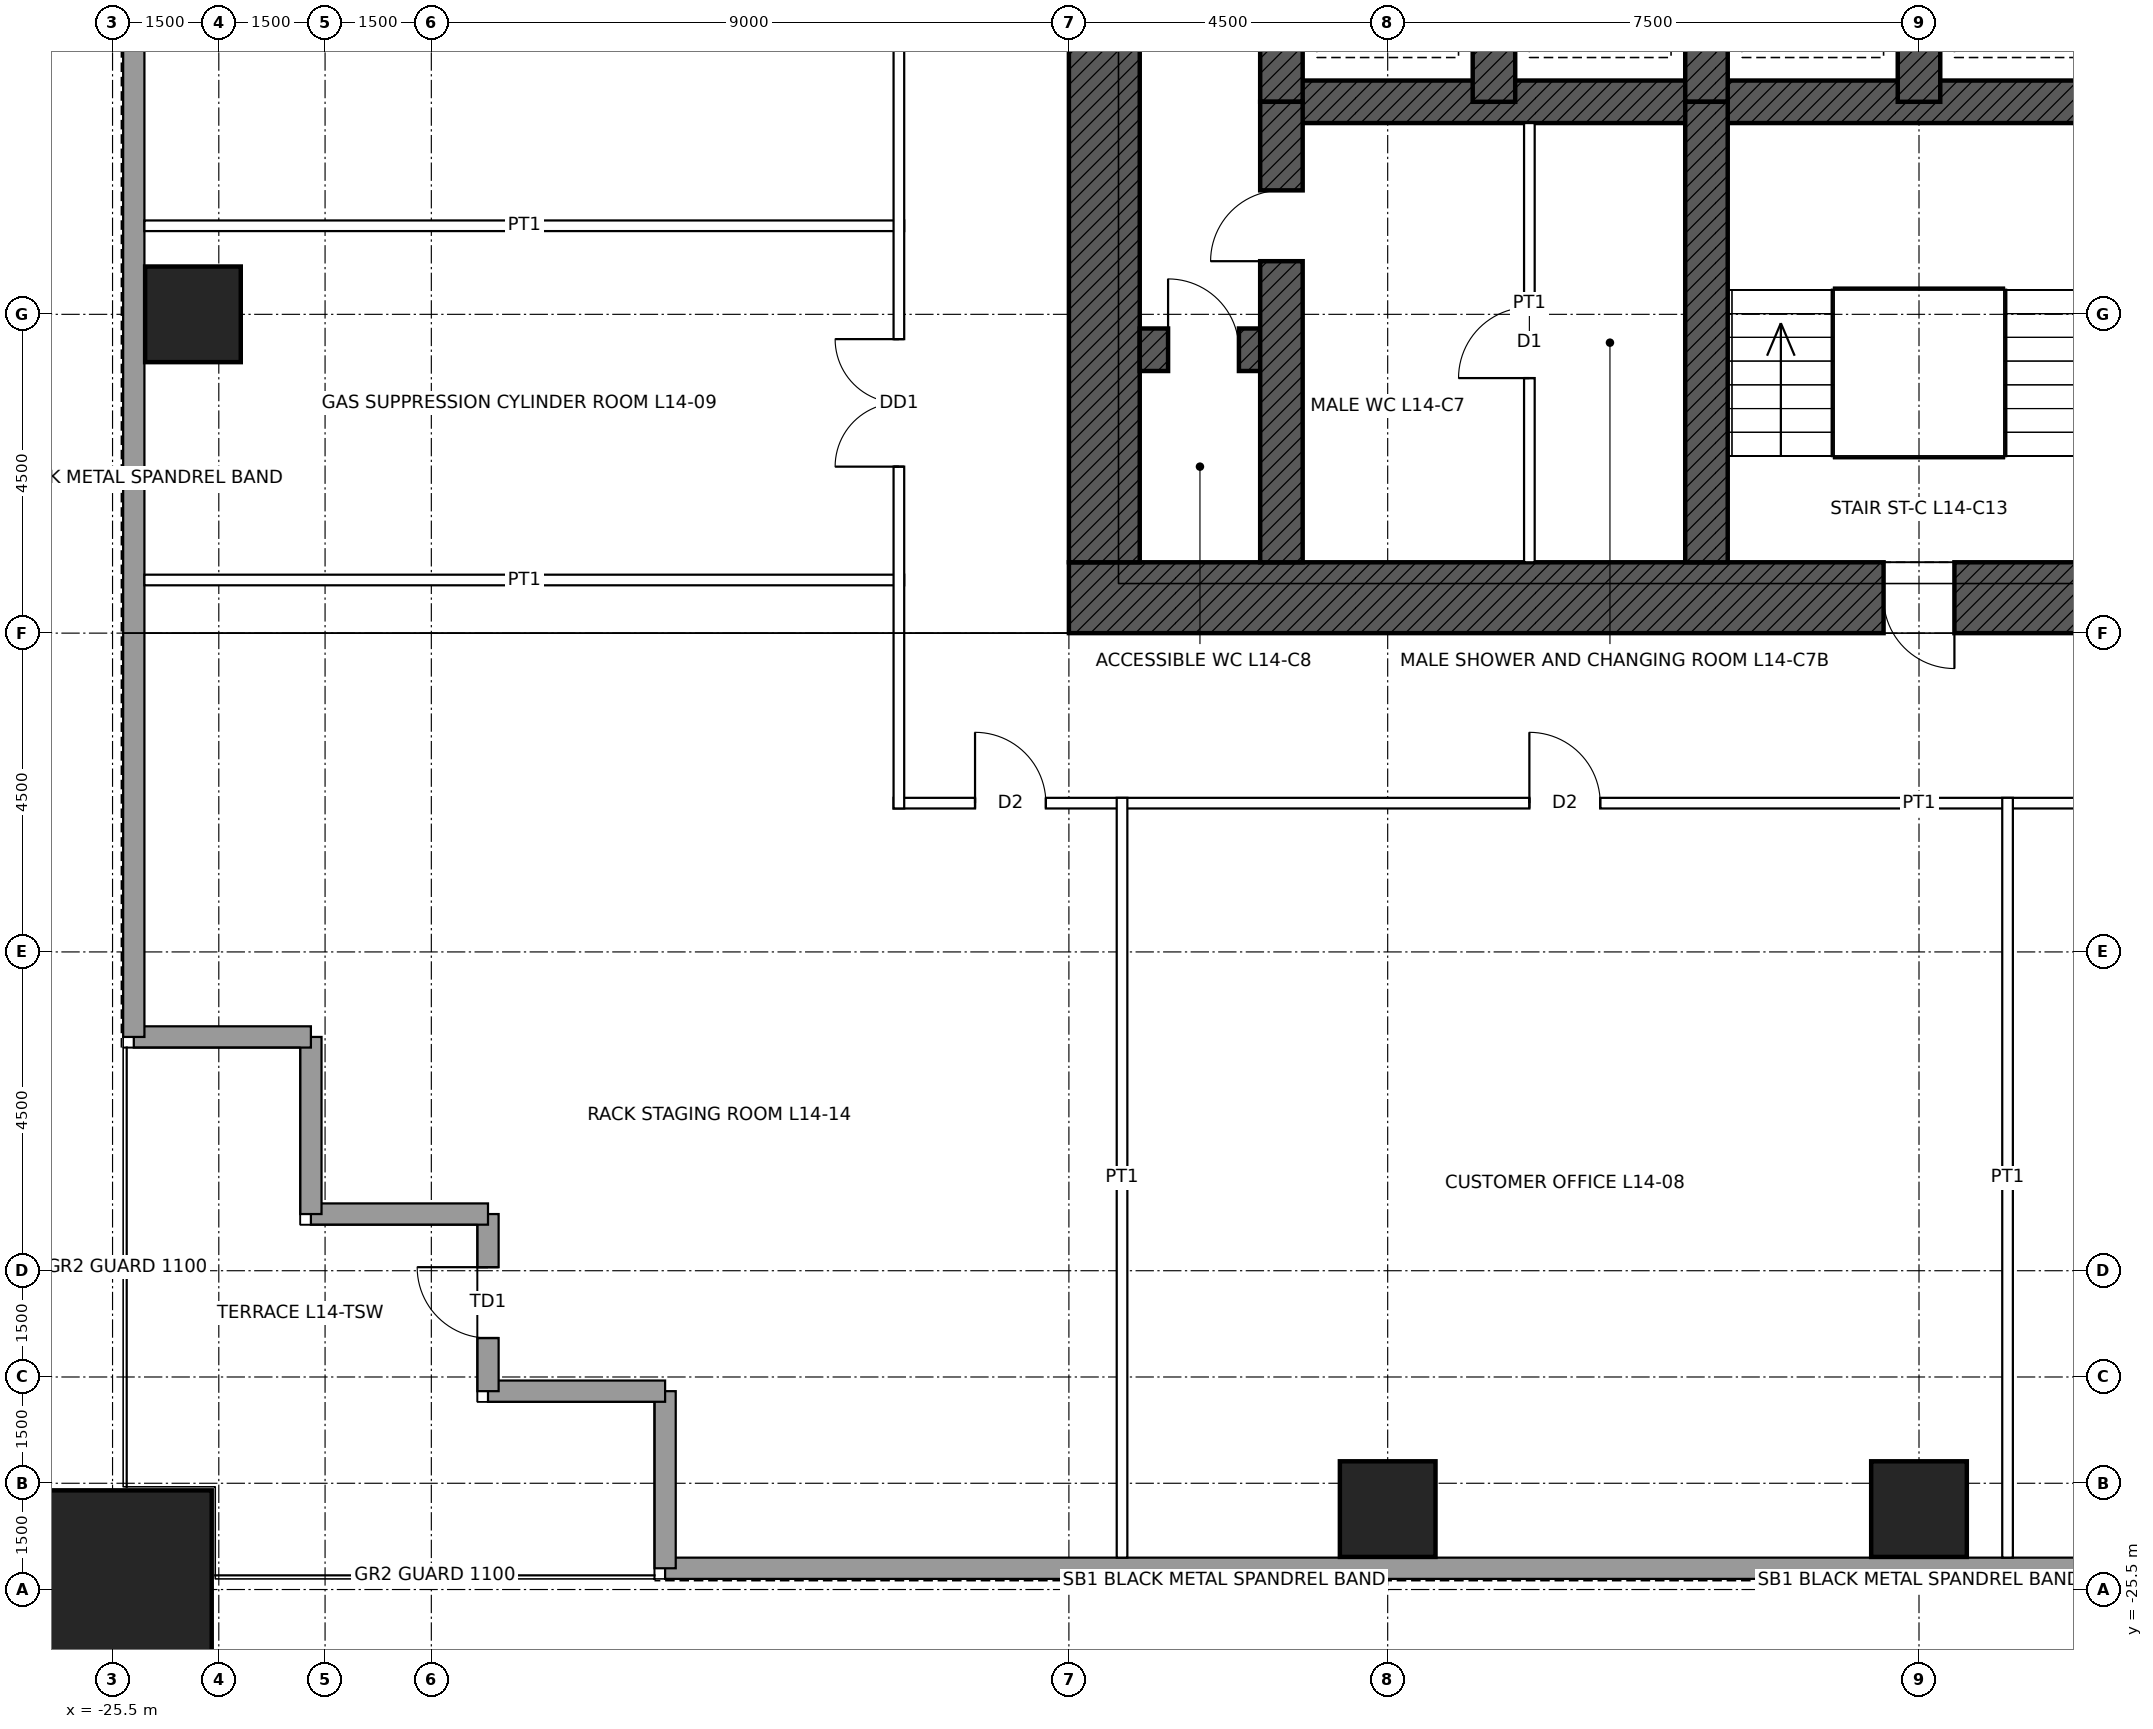
"""IFC4 building model, lengths in metres.
Left out: names, types, materials, properties, quantities, classifications, styles, units other than length and angle.
Written with IfcOpenShell. Run it as: python <this file> out.ifc"""

import sys

from ifc_helpers import new_model, si_unit, direction, frame, frame_2d, origin, origin_2d, place, context, subcontext, project, spatial, rectangle, hollow_rectangle, extrude, element, fill, save


model = new_model("IFC4")
c1 = context("Model", 3, precision=1e-05, world=origin(), true_north=direction((0.0, 1.0)))
c2 = subcontext(c1, "Body", "Model", "MODEL_VIEW")
j1 = project(units=[si_unit("LENGTHUNIT", "METRE"), si_unit("PLANEANGLEUNIT", "RADIAN")], contexts=[c1])
p1 = place(None, origin())
s1 = spatial("IfcSite", under=j1, at=p1, CompositionType="ELEMENT")
p2 = place(p1, origin())
s2 = spatial("IfcBuilding", under=s1, at=p2, CompositionType="ELEMENT")
p3 = place(p2, frame((0.0, 0.0, 73.4)))
s3 = spatial("IfcBuildingStorey", under=s2, at=p3, CompositionType="ELEMENT", Elevation=73.4)
p4 = place(p3, frame((-25.5, -25.5, 0.0), z_axis=(0.0, 0.0, 1.0), x_axis=(1.0, 0.0, 0.0)))
e1 = element("IfcColumn", 1, at=p4, inside=s3, PredefinedType="COLUMN", context=c2, shape_type="SweptSolid", body=[
    extrude(hollow_rectangle(XDim=2.8, YDim=2.8, WallThickness=0.14, at=origin_2d()), origin(), (0.0, 0.0, 1.0), 5.0),
])
for number, where, z_axis, x_axis in (
    (2, (0.0, -24.365, 0.0), (0.0, 0.0, 1.0), (1.0, 0.0, 0.0)),
    (3, (-7.5, -24.365, 0.0), (0.0, 0.0, 1.0), (1.0, 0.0, 0.0)),
    (4, (-24.365, -7.5, 0.0), (0.0, 0.0, 1.0), (1.0, 0.0, 0.0)),
):
    element("IfcColumn", number, at=place(p3, frame(where, z_axis=z_axis, x_axis=x_axis)), inside=s3, PredefinedType="COLUMN", context=c2, shape_type="SweptSolid", body=[
        extrude(hollow_rectangle(XDim=1.35, YDim=1.35, WallThickness=0.085, at=origin_2d()), origin(), (0.0, 0.0, 1.0), 5.0),
    ])
p5 = place(p3, frame((12.0, -11.5, 0.0), z_axis=(0.0, 0.0, 1.0), x_axis=(-1.0, 0.0, 0.0)))
e5 = element("IfcWall", 5, at=p5, inside=s3, PredefinedType="SHEAR", context=c2, shape_type="SweptSolid", body=[
    extrude(rectangle(XDim=24.0, YDim=1.0, at=frame_2d((12.0, 0.0))), origin(), (0.0, 0.0, 1.0), 5.0),
])
p6 = place(p5, frame((11.5, 0.0, 0.0)))
e6 = element("IfcOpeningElement", 6, at=p6, cuts=e5, PredefinedType="OPENING", context=c2, shape_type="SweptSolid", body=[
    extrude(rectangle(XDim=1.0, YDim=2.1, at=frame_2d((0.5, 1.05))), frame((0.0, 0.51, 0.0), z_axis=(0.0, -1.0, 0.0), x_axis=(1.0, 0.0, 0.0)), (0.0, 0.0, 1.0), 1.02),
])
p7 = place(p5, frame((1.0, 0.0, 0.0)))
e7 = element("IfcOpeningElement", 7, at=p7, cuts=e5, PredefinedType="OPENING", context=c2, shape_type="SweptSolid", body=[
    extrude(rectangle(XDim=1.0, YDim=2.4, at=frame_2d((0.5, 1.2))), frame((0.0, 0.51, 0.0), z_axis=(0.0, -1.0, 0.0), x_axis=(1.0, 0.0, 0.0)), (0.0, 0.0, 1.0), 1.02),
])
p8 = place(p3, frame((-11.5, -11.0, 0.0), z_axis=(0.0, 0.0, 1.0), x_axis=(0.0, 1.0, 0.0)))
e8 = element("IfcWall", 8, at=p8, inside=s3, PredefinedType="SHEAR", context=c2, shape_type="SweptSolid", body=[
    extrude(rectangle(XDim=22.0, YDim=1.0, at=frame_2d((11.0, 0.0))), origin(), (0.0, 0.0, 1.0), 5.0),
])
p9 = place(p8, frame((10.5, 0.0, 0.0)))
e9 = element("IfcOpeningElement", 9, at=p9, cuts=e8, PredefinedType="OPENING", context=c2, shape_type="SweptSolid", body=[
    extrude(rectangle(XDim=1.0, YDim=2.4, at=frame_2d((0.5, 1.2))), frame((0.0, 0.51, 0.0), z_axis=(0.0, -1.0, 0.0), x_axis=(1.0, 0.0, 0.0)), (0.0, 0.0, 1.0), 1.02),
])
p10 = place(p3, frame((-9.0, -4.5, 0.0), z_axis=(0.0, 0.0, 1.0), x_axis=(1.0, 0.0, 0.0)))
e10 = element("IfcWall", 10, at=p10, inside=s3, PredefinedType="SHEAR", context=c2, shape_type="SweptSolid", body=[
    extrude(rectangle(XDim=18.0, YDim=0.6, at=frame_2d((9.0, 0.0))), origin(), (0.0, 0.0, 1.0), 5.0),
])
p11 = place(p3, frame((-11.0, -8.0, 0.0), z_axis=(0.0, 0.0, 1.0), x_axis=(1.0, 0.0, 0.0)))
e11 = element("IfcWall", 11, at=p11, inside=s3, PredefinedType="SHEAR", context=c2, shape_type="SweptSolid", body=[
    extrude(rectangle(XDim=2.0, YDim=0.6, at=frame_2d((1.0, 0.0))), origin(), (0.0, 0.0, 1.0), 5.0),
])
p12 = place(p11, frame((0.4, 0.0, 0.0)))
e12 = element("IfcOpeningElement", 12, at=p12, cuts=e11, PredefinedType="OPENING", context=c2, shape_type="SweptSolid", body=[
    extrude(rectangle(XDim=1.0, YDim=2.1, at=frame_2d((0.5, 1.05))), frame((0.0, 0.31, 0.0), z_axis=(0.0, -1.0, 0.0), x_axis=(1.0, 0.0, 0.0)), (0.0, 0.0, 1.0), 0.62),
])
for number, where, z_axis, x_axis in (
    (13, (-9.0, -4.5, 0.0), (0.0, 0.0, 1.0), (0.0, 1.0, 0.0)),
    (14, (-6.0, -4.5, 0.0), (0.0, 0.0, 1.0), (0.0, 1.0, 0.0)),
    (15, (-3.0, -4.5, 0.0), (0.0, 0.0, 1.0), (0.0, 1.0, 0.0)),
    (16, (0.0, -4.5, 0.0), (0.0, 0.0, 1.0), (0.0, 1.0, 0.0)),
):
    element("IfcWall", number, at=place(p3, frame(where, z_axis=z_axis, x_axis=x_axis)), inside=s3, PredefinedType="SHEAR", context=c2, shape_type="SweptSolid", body=[
        extrude(rectangle(XDim=3.0, YDim=0.6, at=frame_2d((1.5, 0.0))), origin(), (0.0, 0.0, 1.0), 5.0),
    ])
p13 = place(p3, frame((-9.0, -11.0, 0.0), z_axis=(0.0, 0.0, 1.0), x_axis=(0.0, 1.0, 0.0)))
e17 = element("IfcWall", 17, at=p13, inside=s3, PredefinedType="SHEAR", context=c2, shape_type="SweptSolid", body=[
    extrude(rectangle(XDim=6.5, YDim=0.6, at=frame_2d((3.25, 0.0))), origin(), (0.0, 0.0, 1.0), 5.0),
])
p14 = place(p13, frame((4.25, 0.0, 0.0)))
e18 = element("IfcOpeningElement", 18, at=p14, cuts=e17, PredefinedType="OPENING", context=c2, shape_type="SweptSolid", body=[
    extrude(rectangle(XDim=1.0, YDim=2.1, at=frame_2d((0.5, 1.05))), frame((0.0, 0.31, 0.0), z_axis=(0.0, -1.0, 0.0), x_axis=(1.0, 0.0, 0.0)), (0.0, 0.0, 1.0), 0.62),
])
p15 = place(p3, frame((-3.0, -11.0, 0.0), z_axis=(0.0, 0.0, 1.0), x_axis=(0.0, 1.0, 0.0)))
e19 = element("IfcWall", 19, at=p15, inside=s3, PredefinedType="SHEAR", context=c2, shape_type="SweptSolid", body=[
    extrude(rectangle(XDim=6.5, YDim=0.6, at=frame_2d((3.25, 0.0))), origin(), (0.0, 0.0, 1.0), 5.0),
])
p16 = place(p3, frame((17.7, -25.2, 0.0), z_axis=(0.0, 0.0, 1.0), x_axis=(-1.0, 0.0, 0.0)))
e20 = element("IfcWall", 20, at=p16, inside=s3, PredefinedType="SOLIDWALL", context=c2, shape_type="SweptSolid", body=[
    extrude(rectangle(XDim=35.4, YDim=0.3, at=frame_2d((17.7, 0.0))), origin(), (0.0, 0.0, 1.0), 4.8),
])
for number, where, z_axis, x_axis in (
    (21, (-17.7, -25.2, 0.0), (0.0, 0.0, 1.0), (0.0, 1.0, 0.0)),
    (22, (-17.7, -22.7, 0.0), (0.0, 0.0, 1.0), (-1.0, 0.0, 0.0)),
):
    element("IfcWall", number, at=place(p3, frame(where, z_axis=z_axis, x_axis=x_axis)), inside=s3, PredefinedType="SOLIDWALL", context=c2, shape_type="SweptSolid", body=[
        extrude(rectangle(XDim=2.5, YDim=0.3, at=frame_2d((1.25, 0.0))), origin(), (0.0, 0.0, 1.0), 4.8),
    ])
p17 = place(p3, frame((-20.2, -22.7, 0.0), z_axis=(0.0, 0.0, 1.0), x_axis=(0.0, 1.0, 0.0)))
e23 = element("IfcWall", 23, at=p17, inside=s3, PredefinedType="SOLIDWALL", context=c2, shape_type="SweptSolid", body=[
    extrude(rectangle(XDim=2.5, YDim=0.3, at=frame_2d((1.25, 0.0))), origin(), (0.0, 0.0, 1.0), 4.8),
])
p18 = place(p17, frame((0.75, 0.0, 0.0)))
e24 = element("IfcOpeningElement", 24, at=p18, cuts=e23, PredefinedType="OPENING", context=c2, shape_type="SweptSolid", body=[
    extrude(rectangle(XDim=1.0, YDim=2.4, at=frame_2d((0.5, 1.2))), frame((0.0, 0.16, 0.0), z_axis=(0.0, -1.0, 0.0), x_axis=(1.0, 0.0, 0.0)), (0.0, 0.0, 1.0), 0.32),
])
for number, where, z_axis, x_axis in (
    (25, (-20.2, -20.2, 0.0), (0.0, 0.0, 1.0), (-1.0, 0.0, 0.0)),
    (26, (-22.7, -20.2, 0.0), (0.0, 0.0, 1.0), (0.0, 1.0, 0.0)),
    (27, (-22.7, -17.7, 0.0), (0.0, 0.0, 1.0), (-1.0, 0.0, 0.0)),
):
    element("IfcWall", number, at=place(p3, frame(where, z_axis=z_axis, x_axis=x_axis)), inside=s3, PredefinedType="SOLIDWALL", context=c2, shape_type="SweptSolid", body=[
        extrude(rectangle(XDim=2.5, YDim=0.3, at=frame_2d((1.25, 0.0))), origin(), (0.0, 0.0, 1.0), 4.8),
    ])
p19 = place(p3, frame((-25.2, -17.7, 0.0), z_axis=(0.0, 0.0, 1.0), x_axis=(0.0, 1.0, 0.0)))
e28 = element("IfcWall", 28, at=p19, inside=s3, PredefinedType="SOLIDWALL", context=c2, shape_type="SweptSolid", body=[
    extrude(rectangle(XDim=35.4, YDim=0.3, at=frame_2d((17.7, 0.0))), origin(), (0.0, 0.0, 1.0), 4.8),
])
p20 = place(p3, frame((-14.475, -14.4, 0.0), z_axis=(0.0, 0.0, 1.0), x_axis=(1.0, 0.0, 0.0)))
e29 = element("IfcWall", 29, at=p20, inside=s3, PredefinedType="PARTITIONING", context=c2, shape_type="SweptSolid", body=[
    extrude(rectangle(XDim=28.95, YDim=0.15, at=frame_2d((14.475, 0.0))), origin(), (0.0, 0.0, 1.0), 4.8),
])
p21 = place(p20, frame((19.825, 0.0, 0.0)))
e30 = element("IfcOpeningElement", 30, at=p21, cuts=e29, PredefinedType="OPENING", context=c2, shape_type="SweptSolid", body=[
    extrude(rectangle(XDim=1.8, YDim=2.4, at=frame_2d((0.9, 1.2))), frame((0.0, 0.085, 0.0), z_axis=(0.0, -1.0, 0.0), x_axis=(1.0, 0.0, 0.0)), (0.0, 0.0, 1.0), 0.17),
])
p22 = place(p20, frame((8.975, 0.0, 0.0)))
e31 = element("IfcOpeningElement", 31, at=p22, cuts=e29, PredefinedType="OPENING", context=c2, shape_type="SweptSolid", body=[
    extrude(rectangle(XDim=1.0, YDim=2.1, at=frame_2d((0.5, 1.05))), frame((0.0, 0.085, 0.0), z_axis=(0.0, -1.0, 0.0), x_axis=(1.0, 0.0, 0.0)), (0.0, 0.0, 1.0), 0.17),
])
p23 = place(p20, frame((26.8, 0.0, 0.0)))
e32 = element("IfcOpeningElement", 32, at=p23, cuts=e29, PredefinedType="OPENING", context=c2, shape_type="SweptSolid", body=[
    extrude(rectangle(XDim=1.0, YDim=2.1, at=frame_2d((0.5, 1.05))), frame((0.0, 0.085, 0.0), z_axis=(0.0, -1.0, 0.0), x_axis=(1.0, 0.0, 0.0)), (0.0, 0.0, 1.0), 0.17),
])
p24 = place(p20, frame((1.15, 0.0, 0.0)))
e33 = element("IfcOpeningElement", 33, at=p24, cuts=e29, PredefinedType="OPENING", context=c2, shape_type="SweptSolid", body=[
    extrude(rectangle(XDim=1.0, YDim=2.1, at=frame_2d((0.5, 1.05))), frame((0.0, 0.085, 0.0), z_axis=(0.0, -1.0, 0.0), x_axis=(1.0, 0.0, 0.0)), (0.0, 0.0, 1.0), 0.17),
])
p25 = place(p3, frame((-25.05, -11.25, 0.0), z_axis=(0.0, 0.0, 1.0), x_axis=(1.0, 0.0, 0.0)))
e34 = element("IfcWall", 34, at=p25, inside=s3, PredefinedType="PARTITIONING", context=c2, shape_type="SweptSolid", body=[
    extrude(rectangle(XDim=10.725, YDim=0.15, at=frame_2d((5.363, 0.0))), origin(), (0.0, 0.0, 1.0), 3.853),
])
p26 = place(p3, frame((-25.05, -6.25, 0.0), z_axis=(0.0, 0.0, 1.0), x_axis=(1.0, 0.0, 0.0)))
e35 = element("IfcWall", 35, at=p26, inside=s3, PredefinedType="PARTITIONING", context=c2, shape_type="SweptSolid", body=[
    extrude(rectangle(XDim=10.725, YDim=0.15, at=frame_2d((5.363, 0.0))), origin(), (0.0, 0.0, 1.0), 4.8),
])
p27 = place(p3, frame((-14.4, -14.475, 0.0), z_axis=(0.0, 0.0, 1.0), x_axis=(0.0, 1.0, 0.0)))
e36 = element("IfcWall", 36, at=p27, inside=s3, PredefinedType="PARTITIONING", context=c2, shape_type="SweptSolid", body=[
    extrude(rectangle(XDim=28.95, YDim=0.15, at=frame_2d((14.475, 0.0))), origin(), (0.0, 0.0, 1.0), 4.8),
])
p28 = place(p27, frame((4.825, 0.0, 0.0)))
e37 = element("IfcOpeningElement", 37, at=p28, cuts=e36, PredefinedType="OPENING", context=c2, shape_type="SweptSolid", body=[
    extrude(rectangle(XDim=1.8, YDim=2.4, at=frame_2d((0.9, 1.2))), frame((0.0, 0.085, 0.0), z_axis=(0.0, -1.0, 0.0), x_axis=(1.0, 0.0, 0.0)), (0.0, 0.0, 1.0), 0.17),
])
p29 = place(p27, frame((11.075, 0.0, 0.0)))
e38 = element("IfcOpeningElement", 38, at=p29, cuts=e36, PredefinedType="OPENING", context=c2, shape_type="SweptSolid", body=[
    extrude(rectangle(XDim=1.8, YDim=2.4, at=frame_2d((0.9, 1.2))), frame((0.0, 0.085, 0.0), z_axis=(0.0, -1.0, 0.0), x_axis=(1.0, 0.0, 0.0)), (0.0, 0.0, 1.0), 0.17),
])
p30 = place(p27, frame((20.225, 0.0, 0.0)))
e39 = element("IfcOpeningElement", 39, at=p30, cuts=e36, PredefinedType="OPENING", context=c2, shape_type="SweptSolid", body=[
    extrude(rectangle(XDim=1.0, YDim=2.1, at=frame_2d((0.5, 1.05))), frame((0.0, 0.085, 0.0), z_axis=(0.0, -1.0, 0.0), x_axis=(1.0, 0.0, 0.0)), (0.0, 0.0, 1.0), 0.17),
])
p31 = place(p3, frame((-11.25, -25.05, 0.0), z_axis=(0.0, 0.0, 1.0), x_axis=(0.0, 1.0, 0.0)))
e40 = element("IfcWall", 40, at=p31, inside=s3, PredefinedType="PARTITIONING", context=c2, shape_type="SweptSolid", body=[
    extrude(rectangle(XDim=10.725, YDim=0.15, at=frame_2d((5.363, 0.0))), origin(), (0.0, 0.0, 1.0), 3.853),
])
p32 = place(p3, frame((1.25, -25.05, 0.0), z_axis=(0.0, 0.0, 1.0), x_axis=(0.0, 1.0, 0.0)))
e41 = element("IfcWall", 41, at=p32, inside=s3, PredefinedType="PARTITIONING", context=c2, shape_type="SweptSolid", body=[
    extrude(rectangle(XDim=10.725, YDim=0.15, at=frame_2d((5.363, 0.0))), origin(), (0.0, 0.0, 1.0), 4.8),
])
p33 = place(p3, frame((-5.5, -11.0, 0.0), z_axis=(0.0, 0.0, 1.0), x_axis=(0.0, 1.0, 0.0)))
e42 = element("IfcWall", 42, at=p33, inside=s3, PredefinedType="PARTITIONING", context=c2, shape_type="SweptSolid", body=[
    extrude(rectangle(XDim=6.2, YDim=0.15, at=frame_2d((3.1, 0.0))), origin(), (0.0, 0.0, 1.0), 4.75),
])
p34 = place(p33, frame((2.6, 0.0, 0.0)))
e43 = element("IfcOpeningElement", 43, at=p34, cuts=e42, PredefinedType="OPENING", context=c2, shape_type="SweptSolid", body=[
    extrude(rectangle(XDim=1.0, YDim=2.1, at=frame_2d((0.5, 1.05))), frame((0.0, 0.085, 0.0), z_axis=(0.0, -1.0, 0.0), x_axis=(1.0, 0.0, 0.0)), (0.0, 0.0, 1.0), 0.17),
])
p35 = place(p18, origin())
e44 = element("IfcDoor", 44, at=p35, inside=s3, OperationType="SINGLE_SWING_RIGHT", PredefinedType="DOOR", context=c2, shape_type="SweptSolid", body=[
    extrude(rectangle(XDim=1.0, YDim=2.4, at=frame_2d((0.5, 1.2))), frame((0.0, 0.025, 0.0), z_axis=(0.0, -1.0, 0.0), x_axis=(1.0, 0.0, 0.0)), (0.0, 0.0, 1.0), 0.05),
])
fill(e24, e44)
p36 = place(p6, origin())
e45 = element("IfcDoor", 45, at=p36, inside=s3, OperationType="SINGLE_SWING_LEFT", PredefinedType="DOOR", context=c2, shape_type="SweptSolid", body=[
    extrude(rectangle(XDim=1.0, YDim=2.1, at=frame_2d((0.5, 1.05))), frame((0.0, 0.485, 0.0), z_axis=(0.0, -1.0, 0.0), x_axis=(1.0, 0.0, 0.0)), (0.0, 0.0, 1.0), 0.05),
])
fill(e6, e45)
p37 = place(p14, origin())
e46 = element("IfcDoor", 46, at=p37, inside=s3, OperationType="SINGLE_SWING_LEFT", PredefinedType="DOOR", context=c2, shape_type="SweptSolid", body=[
    extrude(rectangle(XDim=1.0, YDim=2.1, at=frame_2d((0.5, 1.05))), frame((0.0, 0.025, 0.0), z_axis=(0.0, -1.0, 0.0), x_axis=(1.0, 0.0, 0.0)), (0.0, 0.0, 1.0), 0.05),
])
fill(e18, e46)
p38 = place(p12, origin())
e47 = element("IfcDoor", 47, at=p38, inside=s3, OperationType="SINGLE_SWING_LEFT", PredefinedType="DOOR", context=c2, shape_type="SweptSolid", body=[
    extrude(rectangle(XDim=1.0, YDim=2.1, at=frame_2d((0.5, 1.05))), frame((0.0, 0.025, 0.0), z_axis=(0.0, -1.0, 0.0), x_axis=(1.0, 0.0, 0.0)), (0.0, 0.0, 1.0), 0.05),
])
fill(e12, e47)
p39 = place(p34, origin())
e48 = element("IfcDoor", 48, at=p39, inside=s3, OperationType="SINGLE_SWING_LEFT", PredefinedType="DOOR", context=c2, shape_type="SweptSolid", body=[
    extrude(rectangle(XDim=1.0, YDim=2.1, at=frame_2d((0.5, 1.05))), frame((0.0, 0.025, 0.0), z_axis=(0.0, -1.0, 0.0), x_axis=(1.0, 0.0, 0.0)), (0.0, 0.0, 1.0), 0.05),
])
fill(e43, e48)
p40 = place(p22, origin())
e49 = element("IfcDoor", 49, at=p40, inside=s3, OperationType="SINGLE_SWING_LEFT", PredefinedType="DOOR", context=c2, shape_type="SweptSolid", body=[
    extrude(rectangle(XDim=1.0, YDim=2.1, at=frame_2d((0.5, 1.05))), frame((0.0, 0.025, 0.0), z_axis=(0.0, -1.0, 0.0), x_axis=(1.0, 0.0, 0.0)), (0.0, 0.0, 1.0), 0.05),
])
fill(e31, e49)
p41 = place(p28, origin())
e50 = element("IfcDoor", 50, at=p41, inside=s3, OperationType="DOUBLE_DOOR_SINGLE_SWING", PredefinedType="DOOR", context=c2, shape_type="SweptSolid", body=[
    extrude(rectangle(XDim=1.8, YDim=2.4, at=frame_2d((0.9, 1.2))), frame((0.0, 0.025, 0.0), z_axis=(0.0, -1.0, 0.0), x_axis=(1.0, 0.0, 0.0)), (0.0, 0.0, 1.0), 0.05),
])
fill(e37, e50)
p42 = place(p24, origin())
e51 = element("IfcDoor", 51, at=p42, inside=s3, OperationType="SINGLE_SWING_LEFT", PredefinedType="DOOR", context=c2, shape_type="SweptSolid", body=[
    extrude(rectangle(XDim=1.0, YDim=2.1, at=frame_2d((0.5, 1.05))), frame((0.0, 0.025, 0.0), z_axis=(0.0, -1.0, 0.0), x_axis=(1.0, 0.0, 0.0)), (0.0, 0.0, 1.0), 0.05),
])
fill(e33, e51)
save(model, sys.argv[1])
